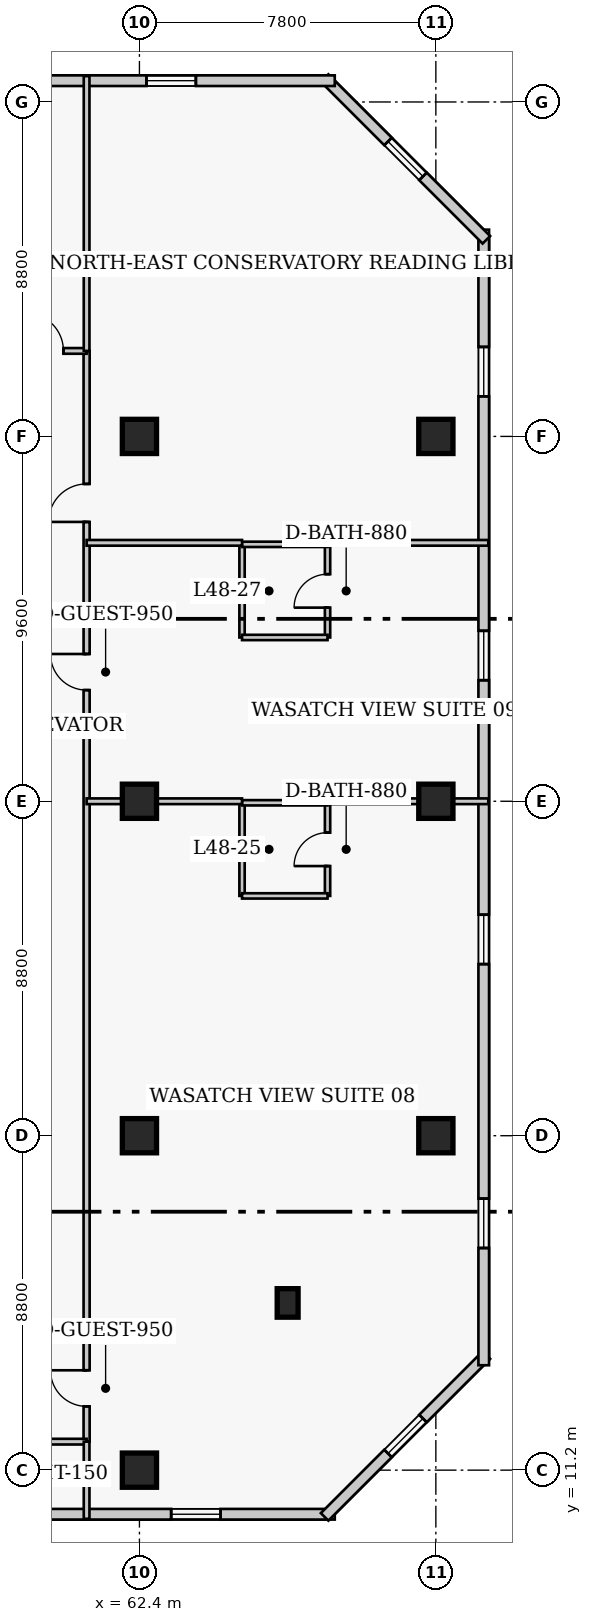
"""IFC4 building model, lengths in metres.
Left out: names, types, materials, properties, quantities, classifications, styles, units other than length and angle.
Written with IfcOpenShell. Run it as: python <this file> out.ifc"""

import sys

from ifc_helpers import new_model, si_unit, direction, frame, frame_2d, origin, origin_2d, place, context, subcontext, project, spatial, rectangle, extrude, element, fill, save


model = new_model("IFC4")
c1 = context("Model", 3, precision=1e-05, world=origin(), true_north=direction((0.0, 1.0)))
c2 = subcontext(c1, "Body", "Model", "MODEL_VIEW")
j1 = project(units=[si_unit("LENGTHUNIT", "METRE"), si_unit("PLANEANGLEUNIT", "RADIAN")], contexts=[c1])
p1 = place(None, origin())
s1 = spatial("IfcSite", under=j1, at=p1, CompositionType="ELEMENT")
p2 = place(p1, origin())
s2 = spatial("IfcBuilding", under=s1, at=p2, CompositionType="ELEMENT")
p3 = place(p2, frame((0.0, 0.0, 192.9)))
s3 = spatial("IfcBuildingStorey", under=s2, at=p3, CompositionType="ELEMENT", Elevation=192.9)
for number, where, z_axis, x_axis in (
    (1, (62.4, 11.2, 0.0), (0.0, 0.0, 1.0), (1.0, 0.0, 0.0)),
    (2, (62.4, 20.0, 0.0), (0.0, 0.0, 1.0), (1.0, 0.0, 0.0)),
    (3, (62.4, 28.8, 0.0), (0.0, 0.0, 1.0), (1.0, 0.0, 0.0)),
    (4, (62.4, 38.4, 0.0), (0.0, 0.0, 1.0), (1.0, 0.0, 0.0)),
    (5, (70.2, 20.0, 0.0), (0.0, 0.0, 1.0), (1.0, 0.0, 0.0)),
    (6, (70.2, 28.8, 0.0), (0.0, 0.0, 1.0), (1.0, 0.0, 0.0)),
    (7, (70.2, 38.4, 0.0), (0.0, 0.0, 1.0), (1.0, 0.0, 0.0)),
):
    element("IfcColumn", number, at=place(p3, frame(where, z_axis=z_axis, x_axis=x_axis)), inside=s3, PredefinedType="COLUMN", context=c2, shape_type="SweptSolid", body=[
        extrude(rectangle(XDim=0.9, YDim=0.9, at=origin_2d()), origin(), (0.0, 0.0, 1.0), 3.9),
    ])
p4 = place(p3, frame((66.3, 15.6, 0.0), z_axis=(0.0, 0.0, 1.0), x_axis=(1.0, 0.0, 0.0)))
e8 = element("IfcColumn", 8, at=p4, inside=s3, PredefinedType="PILASTER", context=c2, shape_type="SweptSolid", body=[
    extrude(rectangle(XDim=0.55, YDim=0.75, at=origin_2d()), origin(), (0.0, 0.0, 1.0), 3.9),
])
p5 = place(p3, frame((41.71, 10.04, 0.0), z_axis=(0.0, 0.0, 1.0), x_axis=(1.0, 0.0, 0.0)))
e9 = element("IfcWall", 9, at=p5, inside=s3, PredefinedType="SOLIDWALL", context=c2, shape_type="SweptSolid", body=[
    extrude(rectangle(XDim=25.83, YDim=0.28, at=frame_2d((12.915, 0.0))), origin(), (0.0, 0.0, 1.0), 3.65),
])
p6 = place(p5, frame((8.29, 0.0, 0.0)))
e10 = element("IfcOpeningElement", 10, at=p6, cuts=e9, PredefinedType="OPENING", context=c2, shape_type="SweptSolid", body=[
    extrude(rectangle(XDim=1.4, YDim=2.15, at=frame_2d((0.7, 1.075))), frame((0.0, 0.15, 0.0), z_axis=(0.0, -1.0, 0.0), x_axis=(1.0, 0.0, 0.0)), (0.0, 0.0, 1.0), 0.3),
])
p7 = place(p5, frame((2.505, 0.0, 0.85)))
e11 = element("IfcOpeningElement", 11, at=p7, cuts=e9, PredefinedType="OPENING", context=c2, shape_type="SweptSolid", body=[
    extrude(rectangle(XDim=1.3, YDim=1.7, at=frame_2d((0.65, 0.85))), frame((0.0, 0.15, 0.0), z_axis=(0.0, -1.0, 0.0), x_axis=(1.0, 0.0, 0.0)), (0.0, 0.0, 1.0), 0.3),
])
p8 = place(p5, frame((13.415, 0.0, 0.85)))
e12 = element("IfcOpeningElement", 12, at=p8, cuts=e9, PredefinedType="OPENING", context=c2, shape_type="SweptSolid", body=[
    extrude(rectangle(XDim=1.3, YDim=1.7, at=frame_2d((0.65, 0.85))), frame((0.0, 0.15, 0.0), z_axis=(0.0, -1.0, 0.0), x_axis=(1.0, 0.0, 0.0)), (0.0, 0.0, 1.0), 0.3),
])
p9 = place(p5, frame((21.525, 0.0, 0.85)))
e13 = element("IfcOpeningElement", 13, at=p9, cuts=e9, PredefinedType="OPENING", context=c2, shape_type="SweptSolid", body=[
    extrude(rectangle(XDim=1.3, YDim=1.7, at=frame_2d((0.65, 0.85))), frame((0.0, 0.15, 0.0), z_axis=(0.0, -1.0, 0.0), x_axis=(1.0, 0.0, 0.0)), (0.0, 0.0, 1.0), 0.3),
])
p10 = place(p3, frame((67.273, 9.971, 0.0), z_axis=(0.0, 0.0, 1.0), x_axis=(0.707106781187, 0.707106781187, 0.0)))
e14 = element("IfcWall", 14, at=p10, inside=s3, PredefinedType="SOLIDWALL", context=c2, shape_type="SweptSolid", body=[
    extrude(rectangle(XDim=6.02, YDim=0.28, at=frame_2d((3.01, 0.0))), origin(), (0.0, 0.0, 1.0), 3.65),
])
p11 = place(p10, frame((2.36, 0.0, 0.85)))
e15 = element("IfcOpeningElement", 15, at=p11, cuts=e14, PredefinedType="OPENING", context=c2, shape_type="SweptSolid", body=[
    extrude(rectangle(XDim=1.3, YDim=1.7, at=frame_2d((0.65, 0.85))), frame((0.0, 0.15, 0.0), z_axis=(0.0, -1.0, 0.0), x_axis=(1.0, 0.0, 0.0)), (0.0, 0.0, 1.0), 0.3),
])
p12 = place(p3, frame((71.46, 13.96, 0.0), z_axis=(0.0, 0.0, 1.0), x_axis=(0.0, 1.0, 0.0)))
e16 = element("IfcWall", 16, at=p12, inside=s3, PredefinedType="SOLIDWALL", context=c2, shape_type="SweptSolid", body=[
    extrude(rectangle(XDim=29.88, YDim=0.28, at=frame_2d((14.94, 0.0))), origin(), (0.0, 0.0, 1.0), 3.65),
])
p13 = place(p12, frame((3.085, 0.0, 0.85)))
e17 = element("IfcOpeningElement", 17, at=p13, cuts=e16, PredefinedType="OPENING", context=c2, shape_type="SweptSolid", body=[
    extrude(rectangle(XDim=1.3, YDim=1.7, at=frame_2d((0.65, 0.85))), frame((0.0, 0.15, 0.0), z_axis=(0.0, -1.0, 0.0), x_axis=(1.0, 0.0, 0.0)), (0.0, 0.0, 1.0), 0.3),
])
p14 = place(p12, frame((10.555, 0.0, 0.85)))
e18 = element("IfcOpeningElement", 18, at=p14, cuts=e16, PredefinedType="OPENING", context=c2, shape_type="SweptSolid", body=[
    extrude(rectangle(XDim=1.3, YDim=1.7, at=frame_2d((0.65, 0.85))), frame((0.0, 0.15, 0.0), z_axis=(0.0, -1.0, 0.0), x_axis=(1.0, 0.0, 0.0)), (0.0, 0.0, 1.0), 0.3),
])
p15 = place(p12, frame((18.025, 0.0, 0.85)))
e19 = element("IfcOpeningElement", 19, at=p15, cuts=e16, PredefinedType="OPENING", context=c2, shape_type="SweptSolid", body=[
    extrude(rectangle(XDim=1.3, YDim=1.7, at=frame_2d((0.65, 0.85))), frame((0.0, 0.15, 0.0), z_axis=(0.0, -1.0, 0.0), x_axis=(1.0, 0.0, 0.0)), (0.0, 0.0, 1.0), 0.3),
])
p16 = place(p12, frame((25.495, 0.0, 0.85)))
e20 = element("IfcOpeningElement", 20, at=p16, cuts=e16, PredefinedType="OPENING", context=c2, shape_type="SweptSolid", body=[
    extrude(rectangle(XDim=1.3, YDim=1.7, at=frame_2d((0.65, 0.85))), frame((0.0, 0.15, 0.0), z_axis=(0.0, -1.0, 0.0), x_axis=(1.0, 0.0, 0.0)), (0.0, 0.0, 1.0), 0.3),
])
p17 = place(p3, frame((71.529, 43.573, 0.0), z_axis=(0.0, 0.0, 1.0), x_axis=(-0.707106781187, 0.707106781187, 0.0)))
e21 = element("IfcWall", 21, at=p17, inside=s3, PredefinedType="SOLIDWALL", context=c2, shape_type="SweptSolid", body=[
    extrude(rectangle(XDim=6.02, YDim=0.28, at=frame_2d((3.01, 0.0))), origin(), (0.0, 0.0, 1.0), 3.65),
])
p18 = place(p17, frame((2.36, 0.0, 0.85)))
e22 = element("IfcOpeningElement", 22, at=p18, cuts=e21, PredefinedType="OPENING", context=c2, shape_type="SweptSolid", body=[
    extrude(rectangle(XDim=1.3, YDim=1.7, at=frame_2d((0.65, 0.85))), frame((0.0, 0.15, 0.0), z_axis=(0.0, -1.0, 0.0), x_axis=(1.0, 0.0, 0.0)), (0.0, 0.0, 1.0), 0.3),
])
p19 = place(p3, frame((67.54, 47.76, 0.0), z_axis=(0.0, 0.0, 1.0), x_axis=(-1.0, 0.0, 0.0)))
e23 = element("IfcWall", 23, at=p19, inside=s3, PredefinedType="SOLIDWALL", context=c2, shape_type="SweptSolid", body=[
    extrude(rectangle(XDim=25.83, YDim=0.28, at=frame_2d((12.915, 0.0))), origin(), (0.0, 0.0, 1.0), 3.65),
])
p20 = place(p19, frame((3.655, 0.0, 0.85)))
e24 = element("IfcOpeningElement", 24, at=p20, cuts=e23, PredefinedType="OPENING", context=c2, shape_type="SweptSolid", body=[
    extrude(rectangle(XDim=1.3, YDim=1.7, at=frame_2d((0.65, 0.85))), frame((0.0, 0.15, 0.0), z_axis=(0.0, -1.0, 0.0), x_axis=(1.0, 0.0, 0.0)), (0.0, 0.0, 1.0), 0.3),
])
p21 = place(p19, frame((22.025, 0.0, 0.85)))
e25 = element("IfcOpeningElement", 25, at=p21, cuts=e23, PredefinedType="OPENING", context=c2, shape_type="SweptSolid", body=[
    extrude(rectangle(XDim=1.3, YDim=1.7, at=frame_2d((0.65, 0.85))), frame((0.0, 0.15, 0.0), z_axis=(0.0, -1.0, 0.0), x_axis=(1.0, 0.0, 0.0)), (0.0, 0.0, 1.0), 0.3),
])
p22 = place(p3, frame((61.01, 11.95, 0.0), z_axis=(0.0, 0.0, 1.0), x_axis=(0.0, 1.0, 0.0)))
e26 = element("IfcWall", 26, at=p22, inside=s3, PredefinedType="PARTITIONING", context=c2, shape_type="SweptSolid", body=[
    extrude(rectangle(XDim=28.7, YDim=0.16, at=frame_2d((14.35, 0.0))), origin(), (0.0, 0.0, 1.0), 3.65),
])
p23 = place(p22, frame((0.928, 0.0, 0.0)))
e27 = element("IfcOpeningElement", 27, at=p23, cuts=e26, PredefinedType="OPENING", context=c2, shape_type="SweptSolid", body=[
    extrude(rectangle(XDim=0.95, YDim=2.1, at=frame_2d((0.475, 1.05))), frame((0.0, 0.09, 0.0), z_axis=(0.0, -1.0, 0.0), x_axis=(1.0, 0.0, 0.0)), (0.0, 0.0, 1.0), 0.18),
])
p24 = place(p22, frame((19.775, 0.0, 0.0)))
e28 = element("IfcOpeningElement", 28, at=p24, cuts=e26, PredefinedType="OPENING", context=c2, shape_type="SweptSolid", body=[
    extrude(rectangle(XDim=0.95, YDim=2.1, at=frame_2d((0.475, 1.05))), frame((0.0, 0.09, 0.0), z_axis=(0.0, -1.0, 0.0), x_axis=(1.0, 0.0, 0.0)), (0.0, 0.0, 1.0), 0.18),
])
p25 = place(p22, frame((24.2, 0.0, 0.0)))
e29 = element("IfcOpeningElement", 29, at=p25, cuts=e26, PredefinedType="OPENING", context=c2, shape_type="SweptSolid", body=[
    extrude(rectangle(XDim=1.0, YDim=2.15, at=frame_2d((0.5, 1.075))), frame((0.0, 0.09, 0.0), z_axis=(0.0, -1.0, 0.0), x_axis=(1.0, 0.0, 0.0)), (0.0, 0.0, 1.0), 0.18),
])
p26 = place(p3, frame((58.79, 11.95, 0.0), z_axis=(0.0, 0.0, 1.0), x_axis=(1.0, 0.0, 0.0)))
e30 = element("IfcWall", 30, at=p26, inside=s3, PredefinedType="PARTITIONING", context=c2, shape_type="SweptSolid", body=[
    extrude(rectangle(XDim=2.22, YDim=0.15, at=frame_2d((1.11, 0.0))), origin(), (0.0, 0.0, 1.0), 3.65),
])
p27 = place(p3, frame((56.8, 40.65, 0.0), z_axis=(0.0, 0.0, 1.0), x_axis=(1.0, 0.0, 0.0)))
e31 = element("IfcWall", 31, at=p27, inside=s3, PredefinedType="PARTITIONING", context=c2, shape_type="SweptSolid", body=[
    extrude(rectangle(XDim=4.21, YDim=0.15, at=frame_2d((2.105, 0.0))), origin(), (0.0, 0.0, 1.0), 3.65),
])
p28 = place(p27, frame((2.6, 0.0, 0.0)))
e32 = element("IfcOpeningElement", 32, at=p28, cuts=e31, PredefinedType="OPENING", context=c2, shape_type="SweptSolid", body=[
    extrude(rectangle(XDim=1.0, YDim=2.15, at=frame_2d((0.5, 1.075))), frame((0.0, 0.085, 0.0), z_axis=(0.0, -1.0, 0.0), x_axis=(1.0, 0.0, 0.0)), (0.0, 0.0, 1.0), 0.17),
])
p29 = place(p3, frame((61.01, 40.65, 0.0), z_axis=(0.0, 0.0, 1.0), x_axis=(0.0, 1.0, 0.0)))
e33 = element("IfcWall", 33, at=p29, inside=s3, PredefinedType="PARTITIONING", context=c2, shape_type="SweptSolid", body=[
    extrude(rectangle(XDim=7.23, YDim=0.15, at=frame_2d((3.615, 0.0))), origin(), (0.0, 0.0, 1.0), 3.65),
])
p30 = place(p3, frame((61.01, 9.92, 0.0), z_axis=(0.0, 0.0, 1.0), x_axis=(0.0, 1.0, 0.0)))
e34 = element("IfcWall", 34, at=p30, inside=s3, PredefinedType="PARTITIONING", context=c2, shape_type="SweptSolid", body=[
    extrude(rectangle(XDim=2.03, YDim=0.15, at=frame_2d((1.015, 0.0))), origin(), (0.0, 0.0, 1.0), 3.65),
])
p31 = place(p3, frame((65.1, 26.31, 0.0), z_axis=(0.0, 0.0, 1.0), x_axis=(0.0, 1.0, 0.0)))
e35 = element("IfcWall", 35, at=p31, inside=s3, PredefinedType="PLUMBINGWALL", context=c2, shape_type="SweptSolid", body=[
    extrude(rectangle(XDim=2.45, YDim=0.14, at=frame_2d((1.225, 0.0))), origin(), (0.0, 0.0, 1.0), 3.65),
])
p32 = place(p3, frame((67.35, 26.31, 0.0), z_axis=(0.0, 0.0, 1.0), x_axis=(0.0, 1.0, 0.0)))
e36 = element("IfcWall", 36, at=p32, inside=s3, PredefinedType="PLUMBINGWALL", context=c2, shape_type="SweptSolid", body=[
    extrude(rectangle(XDim=2.45, YDim=0.14, at=frame_2d((1.225, 0.0))), origin(), (0.0, 0.0, 1.0), 3.65),
])
p33 = place(p32, frame((0.785, 0.0, 0.0)))
e37 = element("IfcOpeningElement", 37, at=p33, cuts=e36, PredefinedType="OPENING", context=c2, shape_type="SweptSolid", body=[
    extrude(rectangle(XDim=0.88, YDim=2.05, at=frame_2d((0.44, 1.025))), frame((0.0, 0.08, 0.0), z_axis=(0.0, -1.0, 0.0), x_axis=(1.0, 0.0, 0.0)), (0.0, 0.0, 1.0), 0.16),
])
p34 = place(p3, frame((65.1, 26.31, 0.0), z_axis=(0.0, 0.0, 1.0), x_axis=(1.0, 0.0, 0.0)))
e38 = element("IfcWall", 38, at=p34, inside=s3, PredefinedType="PLUMBINGWALL", context=c2, shape_type="SweptSolid", body=[
    extrude(rectangle(XDim=2.25, YDim=0.14, at=frame_2d((1.125, 0.0))), origin(), (0.0, 0.0, 1.0), 3.65),
])
p35 = place(p3, frame((65.1, 28.76, 0.0), z_axis=(0.0, 0.0, 1.0), x_axis=(1.0, 0.0, 0.0)))
e39 = element("IfcWall", 39, at=p35, inside=s3, PredefinedType="PLUMBINGWALL", context=c2, shape_type="SweptSolid", body=[
    extrude(rectangle(XDim=2.25, YDim=0.14, at=frame_2d((1.125, 0.0))), origin(), (0.0, 0.0, 1.0), 3.038),
])
p36 = place(p3, frame((61.01, 28.8, 0.0), z_axis=(0.0, 0.0, 1.0), x_axis=(1.0, 0.0, 0.0)))
e40 = element("IfcWall", 40, at=p36, inside=s3, PredefinedType="PARTITIONING", context=c2, shape_type="SweptSolid", body=[
    extrude(rectangle(XDim=4.09, YDim=0.15, at=frame_2d((2.045, 0.0))), origin(), (0.0, 0.0, 1.0), 2.878),
])
p37 = place(p3, frame((67.35, 28.8, 0.0), z_axis=(0.0, 0.0, 1.0), x_axis=(1.0, 0.0, 0.0)))
e41 = element("IfcWall", 41, at=p37, inside=s3, PredefinedType="PARTITIONING", context=c2, shape_type="SweptSolid", body=[
    extrude(rectangle(XDim=4.23, YDim=0.15, at=frame_2d((2.115, 0.0))), origin(), (0.0, 0.0, 1.0), 2.878),
])
p38 = place(p3, frame((65.1, 33.11, 0.0), z_axis=(0.0, 0.0, 1.0), x_axis=(0.0, 1.0, 0.0)))
e42 = element("IfcWall", 42, at=p38, inside=s3, PredefinedType="PLUMBINGWALL", context=c2, shape_type="SweptSolid", body=[
    extrude(rectangle(XDim=2.45, YDim=0.14, at=frame_2d((1.225, 0.0))), origin(), (0.0, 0.0, 1.0), 3.65),
])
p39 = place(p3, frame((67.35, 33.11, 0.0), z_axis=(0.0, 0.0, 1.0), x_axis=(0.0, 1.0, 0.0)))
e43 = element("IfcWall", 43, at=p39, inside=s3, PredefinedType="PLUMBINGWALL", context=c2, shape_type="SweptSolid", body=[
    extrude(rectangle(XDim=2.45, YDim=0.14, at=frame_2d((1.225, 0.0))), origin(), (0.0, 0.0, 1.0), 3.65),
])
p40 = place(p39, frame((0.785, 0.0, 0.0)))
e44 = element("IfcOpeningElement", 44, at=p40, cuts=e43, PredefinedType="OPENING", context=c2, shape_type="SweptSolid", body=[
    extrude(rectangle(XDim=0.88, YDim=2.05, at=frame_2d((0.44, 1.025))), frame((0.0, 0.08, 0.0), z_axis=(0.0, -1.0, 0.0), x_axis=(1.0, 0.0, 0.0)), (0.0, 0.0, 1.0), 0.16),
])
for number, where, z_axis, x_axis in (
    (45, (65.1, 33.11, 0.0), (0.0, 0.0, 1.0), (1.0, 0.0, 0.0)),
    (46, (65.1, 35.56, 0.0), (0.0, 0.0, 1.0), (1.0, 0.0, 0.0)),
):
    element("IfcWall", number, at=place(p3, frame(where, z_axis=z_axis, x_axis=x_axis)), inside=s3, PredefinedType="PLUMBINGWALL", context=c2, shape_type="SweptSolid", body=[
        extrude(rectangle(XDim=2.25, YDim=0.14, at=frame_2d((1.125, 0.0))), origin(), (0.0, 0.0, 1.0), 3.65),
    ])
p41 = place(p3, frame((61.01, 35.6, 0.0), z_axis=(0.0, 0.0, 1.0), x_axis=(1.0, 0.0, 0.0)))
e47 = element("IfcWall", 47, at=p41, inside=s3, PredefinedType="PARTITIONING", context=c2, shape_type="SweptSolid", body=[
    extrude(rectangle(XDim=4.09, YDim=0.15, at=frame_2d((2.045, 0.0))), origin(), (0.0, 0.0, 1.0), 3.65),
])
p42 = place(p3, frame((67.35, 35.6, 0.0), z_axis=(0.0, 0.0, 1.0), x_axis=(1.0, 0.0, 0.0)))
e48 = element("IfcWall", 48, at=p42, inside=s3, PredefinedType="PARTITIONING", context=c2, shape_type="SweptSolid", body=[
    extrude(rectangle(XDim=4.23, YDim=0.15, at=frame_2d((2.115, 0.0))), origin(), (0.0, 0.0, 1.0), 3.65),
])
p43 = place(p9, origin())
e49 = element("IfcWindow", 49, at=p43, inside=s3, PartitioningType="SINGLE_PANEL", PredefinedType="WINDOW", context=c2, shape_type="SweptSolid", body=[
    extrude(rectangle(XDim=1.3, YDim=1.7, at=frame_2d((0.65, 0.85))), frame((0.0, 0.03, 0.0), z_axis=(0.0, -1.0, 0.0), x_axis=(1.0, 0.0, 0.0)), (0.0, 0.0, 1.0), 0.06),
])
fill(e13, e49)
p44 = place(p11, origin())
e50 = element("IfcWindow", 50, at=p44, inside=s3, PartitioningType="SINGLE_PANEL", PredefinedType="WINDOW", context=c2, shape_type="SweptSolid", body=[
    extrude(rectangle(XDim=1.3, YDim=1.7, at=frame_2d((0.65, 0.85))), frame((0.0, 0.03, 0.0), z_axis=(0.0, -1.0, 0.0), x_axis=(1.0, 0.0, 0.0)), (0.0, 0.0, 1.0), 0.06),
])
fill(e15, e50)
p45 = place(p13, origin())
e51 = element("IfcWindow", 51, at=p45, inside=s3, PartitioningType="SINGLE_PANEL", PredefinedType="WINDOW", context=c2, shape_type="SweptSolid", body=[
    extrude(rectangle(XDim=1.3, YDim=1.7, at=frame_2d((0.65, 0.85))), frame((0.0, 0.03, 0.0), z_axis=(0.0, -1.0, 0.0), x_axis=(1.0, 0.0, 0.0)), (0.0, 0.0, 1.0), 0.06),
])
fill(e17, e51)
p46 = place(p14, origin())
e52 = element("IfcWindow", 52, at=p46, inside=s3, PartitioningType="SINGLE_PANEL", PredefinedType="WINDOW", context=c2, shape_type="SweptSolid", body=[
    extrude(rectangle(XDim=1.3, YDim=1.7, at=frame_2d((0.65, 0.85))), frame((0.0, 0.03, 0.0), z_axis=(0.0, -1.0, 0.0), x_axis=(1.0, 0.0, 0.0)), (0.0, 0.0, 1.0), 0.06),
])
fill(e18, e52)
p47 = place(p15, origin())
e53 = element("IfcWindow", 53, at=p47, inside=s3, PartitioningType="SINGLE_PANEL", PredefinedType="WINDOW", context=c2, shape_type="SweptSolid", body=[
    extrude(rectangle(XDim=1.3, YDim=1.7, at=frame_2d((0.65, 0.85))), frame((0.0, 0.03, 0.0), z_axis=(0.0, -1.0, 0.0), x_axis=(1.0, 0.0, 0.0)), (0.0, 0.0, 1.0), 0.06),
])
fill(e19, e53)
p48 = place(p16, origin())
e54 = element("IfcWindow", 54, at=p48, inside=s3, PartitioningType="SINGLE_PANEL", PredefinedType="WINDOW", context=c2, shape_type="SweptSolid", body=[
    extrude(rectangle(XDim=1.3, YDim=1.7, at=frame_2d((0.65, 0.85))), frame((0.0, 0.03, 0.0), z_axis=(0.0, -1.0, 0.0), x_axis=(1.0, 0.0, 0.0)), (0.0, 0.0, 1.0), 0.06),
])
fill(e20, e54)
p49 = place(p18, origin())
e55 = element("IfcWindow", 55, at=p49, inside=s3, PartitioningType="SINGLE_PANEL", PredefinedType="WINDOW", context=c2, shape_type="SweptSolid", body=[
    extrude(rectangle(XDim=1.3, YDim=1.7, at=frame_2d((0.65, 0.85))), frame((0.0, 0.03, 0.0), z_axis=(0.0, -1.0, 0.0), x_axis=(1.0, 0.0, 0.0)), (0.0, 0.0, 1.0), 0.06),
])
fill(e22, e55)
p50 = place(p20, origin())
e56 = element("IfcWindow", 56, at=p50, inside=s3, PartitioningType="SINGLE_PANEL", PredefinedType="WINDOW", context=c2, shape_type="SweptSolid", body=[
    extrude(rectangle(XDim=1.3, YDim=1.7, at=frame_2d((0.65, 0.85))), frame((0.0, 0.03, 0.0), z_axis=(0.0, -1.0, 0.0), x_axis=(1.0, 0.0, 0.0)), (0.0, 0.0, 1.0), 0.06),
])
fill(e24, e56)
p51 = place(p28, origin())
e57 = element("IfcDoor", 57, at=p51, inside=s3, OperationType="SINGLE_SWING_LEFT", PredefinedType="DOOR", context=c2, shape_type="SweptSolid", body=[
    extrude(rectangle(XDim=1.0, YDim=2.15, at=frame_2d((0.5, 1.075))), frame((0.0, 0.025, 0.0), z_axis=(0.0, -1.0, 0.0), x_axis=(1.0, 0.0, 0.0)), (0.0, 0.0, 1.0), 0.05),
])
fill(e32, e57)
p52 = place(p33, origin())
e58 = element("IfcDoor", 58, at=p52, inside=s3, OperationType="SINGLE_SWING_LEFT", PredefinedType="DOOR", context=c2, shape_type="SweptSolid", body=[
    extrude(rectangle(XDim=0.88, YDim=2.05, at=frame_2d((0.44, 1.025))), frame((0.0, 0.025, 0.0), z_axis=(0.0, -1.0, 0.0), x_axis=(1.0, 0.0, 0.0)), (0.0, 0.0, 1.0), 0.05),
])
fill(e37, e58)
p53 = place(p23, origin())
e59 = element("IfcDoor", 59, at=p53, inside=s3, OperationType="SINGLE_SWING_RIGHT", PredefinedType="DOOR", context=c2, shape_type="SweptSolid", body=[
    extrude(rectangle(XDim=0.95, YDim=2.1, at=frame_2d((0.475, 1.05))), frame((0.0, 0.025, 0.0), z_axis=(0.0, -1.0, 0.0), x_axis=(1.0, 0.0, 0.0)), (0.0, 0.0, 1.0), 0.05),
])
fill(e27, e59)
p54 = place(p40, origin())
e60 = element("IfcDoor", 60, at=p54, inside=s3, OperationType="SINGLE_SWING_LEFT", PredefinedType="DOOR", context=c2, shape_type="SweptSolid", body=[
    extrude(rectangle(XDim=0.88, YDim=2.05, at=frame_2d((0.44, 1.025))), frame((0.0, 0.025, 0.0), z_axis=(0.0, -1.0, 0.0), x_axis=(1.0, 0.0, 0.0)), (0.0, 0.0, 1.0), 0.05),
])
fill(e44, e60)
p55 = place(p24, origin())
e61 = element("IfcDoor", 61, at=p55, inside=s3, OperationType="SINGLE_SWING_RIGHT", PredefinedType="DOOR", context=c2, shape_type="SweptSolid", body=[
    extrude(rectangle(XDim=0.95, YDim=2.1, at=frame_2d((0.475, 1.05))), frame((0.0, 0.025, 0.0), z_axis=(0.0, -1.0, 0.0), x_axis=(1.0, 0.0, 0.0)), (0.0, 0.0, 1.0), 0.05),
])
fill(e28, e61)
p56 = place(p25, origin())
e62 = element("IfcDoor", 62, at=p56, inside=s3, OperationType="SINGLE_SWING_LEFT", PredefinedType="DOOR", context=c2, shape_type="SweptSolid", body=[
    extrude(rectangle(XDim=1.0, YDim=2.15, at=frame_2d((0.5, 1.075))), frame((0.0, 0.025, 0.0), z_axis=(0.0, -1.0, 0.0), x_axis=(1.0, 0.0, 0.0)), (0.0, 0.0, 1.0), 0.05),
])
fill(e29, e62)
save(model, sys.argv[1])
